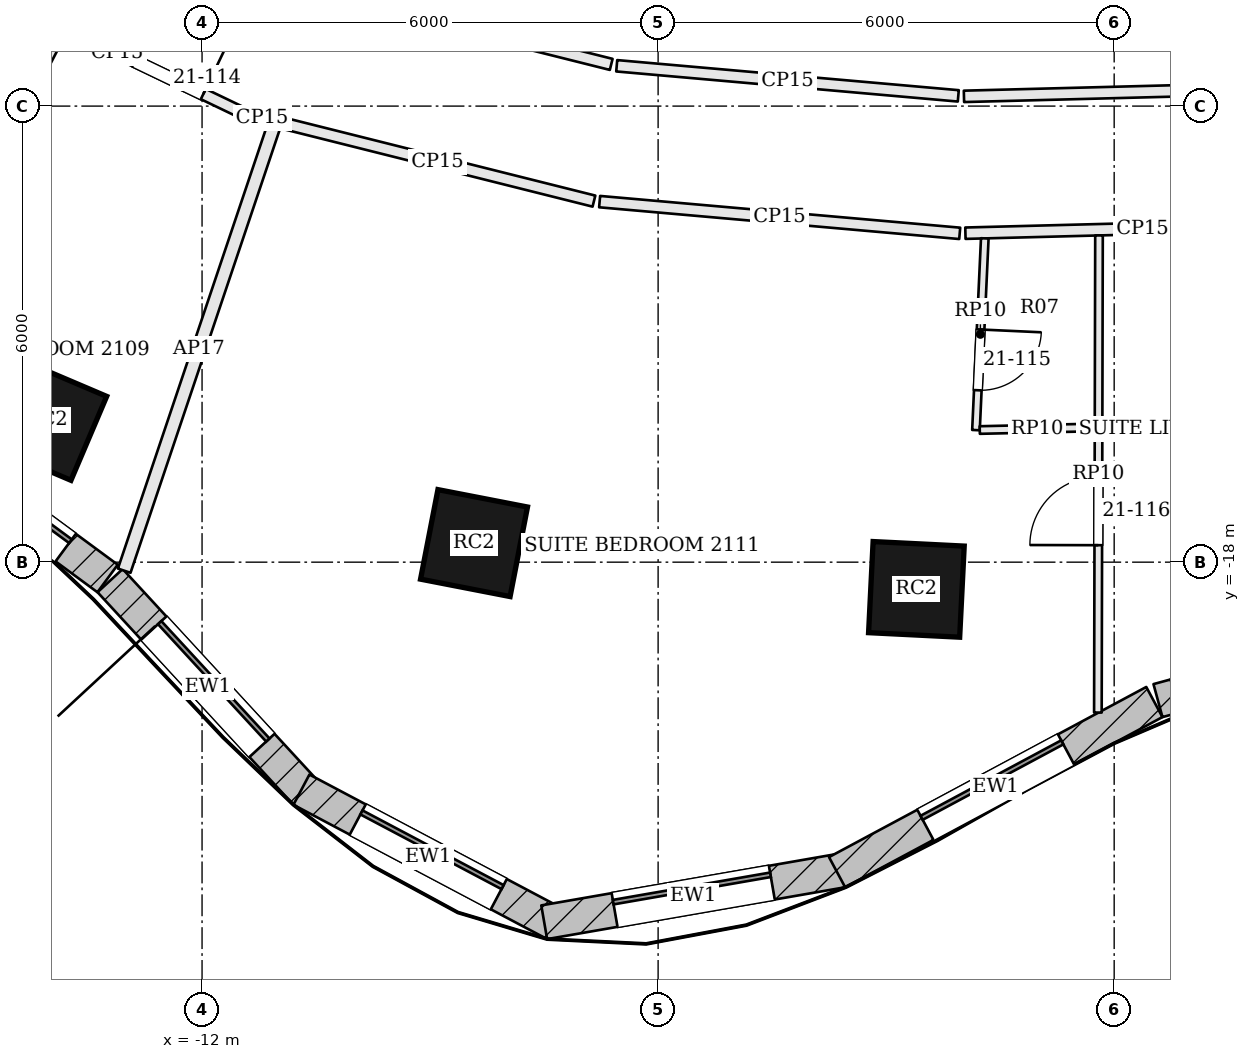
"""IFC4 building model, lengths in metres.
Left out: names, types, materials, properties, quantities, classifications, styles, units other than length and angle.
Written with IfcOpenShell. Run it as: python <this file> out.ifc"""

import sys

from ifc_helpers import new_model, si_unit, direction, frame, frame_2d, origin, origin_2d, place, context, subcontext, project, spatial, rectangle, extrude, element, fill, save


model = new_model("IFC4")
c1 = context("Model", 3, precision=1e-05, world=origin(), true_north=direction((0.0, 1.0)))
c2 = subcontext(c1, "Body", "Model", "MODEL_VIEW")
j1 = project(units=[si_unit("LENGTHUNIT", "METRE"), si_unit("PLANEANGLEUNIT", "RADIAN")], contexts=[c1])
p1 = place(None, origin())
s1 = spatial("IfcSite", under=j1, at=p1, CompositionType="ELEMENT")
p2 = place(p1, origin())
s2 = spatial("IfcBuilding", under=s1, at=p2, CompositionType="ELEMENT")
p3 = place(p2, frame((0.0, 0.0, 92.4)))
s3 = spatial("IfcBuildingStorey", under=s2, at=p3, CompositionType="ELEMENT", Elevation=92.4)
for number, where, z_axis, x_axis in (
    (1, (-14.042, -16.136, 0.0), (0.0, 0.0, 1.0), (0.92, -0.392, 0.0)),
    (2, (-8.422, -17.749, 0.0), (0.0, 0.0, 1.0), (0.982, -0.191, 0.0)),
    (3, (-2.602, -18.358, 0.0), (0.0, 0.0, 1.0), (0.999, -0.05, 0.0)),
):
    element("IfcColumn", number, at=place(p3, frame(where, z_axis=z_axis, x_axis=x_axis)), inside=s3, PredefinedType="COLUMN", context=c2, shape_type="SweptSolid", body=[
        extrude(rectangle(XDim=1.2, YDim=1.2, at=origin_2d()), origin(), (0.0, 0.0, 1.0), 3.6),
    ])
p4 = place(p3, frame((-16.036, -16.158, 0.0), z_axis=(0.0, 0.0, 1.0), x_axis=(0.805181432967, -0.593028549064, 0.0)))
e4 = element("IfcWall", 4, at=p4, inside=s3, PredefinedType="SOLIDWALL", context=c2, shape_type="SweptSolid", body=[
    extrude(rectangle(XDim=3.469, YDim=0.45, at=frame_2d((1.734, 0.0))), origin(), (0.0, 0.0, 1.0), 3.4),
])
p5 = place(p4, frame((0.684, 0.0, 0.9)))
e5 = element("IfcOpeningElement", 5, at=p5, cuts=e4, PredefinedType="OPENING", context=c2, shape_type="SweptSolid", body=[
    extrude(rectangle(XDim=2.1, YDim=2.0, at=frame_2d((1.05, 1.0))), frame((0.0, 0.235, 0.0), z_axis=(0.0, -1.0, 0.0), x_axis=(1.0, 0.0, 0.0)), (0.0, 0.0, 1.0), 0.47),
])
p6 = place(p3, frame((-13.209, -18.243, 0.0), z_axis=(0.0, 0.0, 1.0), x_axis=(0.677612152497, -0.735419452278, 0.0)))
e6 = element("IfcWall", 6, at=p6, inside=s3, PredefinedType="SOLIDWALL", context=c2, shape_type="SweptSolid", body=[
    extrude(rectangle(XDim=3.797, YDim=0.45, at=frame_2d((1.898, 0.0))), origin(), (0.0, 0.0, 1.0), 3.4),
])
p7 = place(p6, frame((0.848, 0.0, 0.9)))
e7 = element("IfcOpeningElement", 7, at=p7, cuts=e6, PredefinedType="OPENING", context=c2, shape_type="SweptSolid", body=[
    extrude(rectangle(XDim=2.1, YDim=2.0, at=frame_2d((1.05, 1.0))), frame((0.0, 0.235, 0.0), z_axis=(0.0, -1.0, 0.0), x_axis=(1.0, 0.0, 0.0)), (0.0, 0.0, 1.0), 0.47),
])
p8 = place(p3, frame((-10.693, -20.993, 0.0), z_axis=(0.0, 0.0, 1.0), x_axis=(0.883817790726, -0.46783128668, 0.0)))
e8 = element("IfcWall", 8, at=p8, inside=s3, PredefinedType="SOLIDWALL", context=c2, shape_type="SweptSolid", body=[
    extrude(rectangle(XDim=3.777, YDim=0.45, at=frame_2d((1.888, 0.0))), origin(), (0.0, 0.0, 1.0), 3.4),
])
p9 = place(p8, frame((0.838, 0.0, 0.9)))
e9 = element("IfcOpeningElement", 9, at=p9, cuts=e8, PredefinedType="OPENING", context=c2, shape_type="SweptSolid", body=[
    extrude(rectangle(XDim=2.1, YDim=2.0, at=frame_2d((1.05, 1.0))), frame((0.0, 0.235, 0.0), z_axis=(0.0, -1.0, 0.0), x_axis=(1.0, 0.0, 0.0)), (0.0, 0.0, 1.0), 0.47),
])
p10 = place(p3, frame((-7.499, -22.737, 0.0), z_axis=(0.0, 0.0, 1.0), x_axis=(0.98521220506, 0.171338585849, 0.0)))
e10 = element("IfcWall", 10, at=p10, inside=s3, PredefinedType="SOLIDWALL", context=c2, shape_type="SweptSolid", body=[
    extrude(rectangle(XDim=3.98, YDim=0.45, at=frame_2d((1.99, 0.0))), origin(), (0.0, 0.0, 1.0), 3.4),
])
p11 = place(p10, frame((0.94, 0.0, 0.9)))
e11 = element("IfcOpeningElement", 11, at=p11, cuts=e10, PredefinedType="OPENING", context=c2, shape_type="SweptSolid", body=[
    extrude(rectangle(XDim=2.1, YDim=2.0, at=frame_2d((1.05, 1.0))), frame((0.0, 0.235, 0.0), z_axis=(0.0, -1.0, 0.0), x_axis=(1.0, 0.0, 0.0)), (0.0, 0.0, 1.0), 0.47),
])
p12 = place(p3, frame((-3.646, -22.079, 0.0), z_axis=(0.0, 0.0, 1.0), x_axis=(0.881279133897, 0.472596115259, 0.0)))
e12 = element("IfcWall", 12, at=p12, inside=s3, PredefinedType="SOLIDWALL", context=c2, shape_type="SweptSolid", body=[
    extrude(rectangle(XDim=4.737, YDim=0.45, at=frame_2d((2.368, 0.0))), origin(), (0.0, 0.0, 1.0), 3.4),
])
p13 = place(p12, frame((1.318, 0.0, 0.9)))
e13 = element("IfcOpeningElement", 13, at=p13, cuts=e12, PredefinedType="OPENING", context=c2, shape_type="SweptSolid", body=[
    extrude(rectangle(XDim=2.1, YDim=2.0, at=frame_2d((1.05, 1.0))), frame((0.0, 0.235, 0.0), z_axis=(0.0, -1.0, 0.0), x_axis=(1.0, 0.0, 0.0)), (0.0, 0.0, 1.0), 0.47),
])
p14 = place(p3, frame((0.576, -19.821, 0.0), z_axis=(0.0, 0.0, 1.0), x_axis=(0.965009398019, 0.262215296532, 0.0)))
e14 = element("IfcWall", 14, at=p14, inside=s3, PredefinedType="SOLIDWALL", context=c2, shape_type="SweptSolid", body=[
    extrude(rectangle(XDim=2.565, YDim=0.45, at=frame_2d((1.283, 0.0))), origin(), (0.0, 0.0, 1.0), 3.4),
])
p15 = place(p14, frame((0.233, 0.0, 0.9)))
e15 = element("IfcOpeningElement", 15, at=p15, cuts=e14, PredefinedType="OPENING", context=c2, shape_type="SweptSolid", body=[
    extrude(rectangle(XDim=2.1, YDim=2.0, at=frame_2d((1.05, 1.0))), frame((0.0, 0.235, 0.0), z_axis=(0.0, -1.0, 0.0), x_axis=(1.0, 0.0, 0.0)), (0.0, 0.0, 1.0), 0.47),
])
p16 = place(p3, frame((-14.771, -10.503, 0.0), z_axis=(0.0, 0.0, 1.0), x_axis=(0.901503349553, -0.432772123346, 0.0)))
e16 = element("IfcWall", 16, at=p16, inside=s3, PredefinedType="PARTITIONING", context=c2, shape_type="SweptSolid", body=[
    extrude(rectangle(XDim=3.673, YDim=0.15, at=frame_2d((1.836, 0.0))), origin(), (0.0, 0.0, 1.0), 2.784),
])
p17 = place(p16, frame((2.092, 0.0, 0.0)))
e17 = element("IfcOpeningElement", 17, at=p17, cuts=e16, PredefinedType="OPENING", context=c2, shape_type="SweptSolid", body=[
    extrude(rectangle(XDim=1.0, YDim=2.1, at=frame_2d((0.5, 1.05))), frame((0.0, 0.085, 0.0), z_axis=(0.0, -1.0, 0.0), x_axis=(1.0, 0.0, 0.0)), (0.0, 0.0, 1.0), 0.17),
])
p18 = place(p3, frame((-11.387, -12.111, 0.0), z_axis=(0.0, 0.0, 1.0), x_axis=(0.969945028314, -0.243324150157, 0.0)))
e18 = element("IfcWall", 18, at=p18, inside=s3, PredefinedType="PARTITIONING", context=c2, shape_type="SweptSolid", body=[
    extrude(rectangle(XDim=0.364, YDim=0.15, at=frame_2d((0.182, 0.0))), origin(), (0.0, 0.0, 1.0), 2.784),
])
p19 = place(p3, frame((-13.024, -18.112, 0.0), z_axis=(0.0, 0.0, 1.0), x_axis=(0.319078434674, 0.947728311556, 0.0)))
e19 = element("IfcWall", 19, at=p19, inside=s3, PredefinedType="PARTITIONING", context=c2, shape_type="SweptSolid", body=[
    extrude(rectangle(XDim=6.163, YDim=0.175, at=frame_2d((3.082, 0.0))), origin(), (0.0, 0.0, 1.0), 2.784),
])
p20 = place(p3, frame((-10.961, -12.218, 0.0), z_axis=(0.0, 0.0, 1.0), x_axis=(0.969990045386, -0.243144631551, 0.0)))
e20 = element("IfcWall", 20, at=p20, inside=s3, PredefinedType="PARTITIONING", context=c2, shape_type="SweptSolid", body=[
    extrude(rectangle(XDim=4.244, YDim=0.15, at=frame_2d((2.122, 0.0))), origin(), (0.0, 0.0, 1.0), 2.784),
])
p21 = place(p3, frame((-6.77, -13.257, 0.0), z_axis=(0.0, 0.0, 1.0), x_axis=(0.996139758015, -0.08778144737, 0.0)))
e21 = element("IfcWall", 21, at=p21, inside=s3, PredefinedType="PARTITIONING", context=c2, shape_type="SweptSolid", body=[
    extrude(rectangle(XDim=4.756, YDim=0.15, at=frame_2d((2.378, 0.0))), origin(), (0.0, 0.0, 1.0), 2.784),
])
p22 = place(p3, frame((-1.957, -13.672, 0.0), z_axis=(0.0, 0.0, 1.0), x_axis=(0.999664413823, 0.025904820691, 0.0)))
e22 = element("IfcWall", 22, at=p22, inside=s3, PredefinedType="PARTITIONING", context=c2, shape_type="SweptSolid", body=[
    extrude(rectangle(XDim=4.665, YDim=0.15, at=frame_2d((2.333, 0.0))), origin(), (0.0, 0.0, 1.0), 2.784),
])
p23 = place(p22, frame((2.712, 0.0, 0.0)))
e23 = element("IfcOpeningElement", 23, at=p23, cuts=e22, PredefinedType="OPENING", context=c2, shape_type="SweptSolid", body=[
    extrude(rectangle(XDim=1.0, YDim=2.1, at=frame_2d((0.5, 1.05))), frame((0.0, 0.085, 0.0), z_axis=(0.0, -1.0, 0.0), x_axis=(1.0, 0.0, 0.0)), (0.0, 0.0, 1.0), 0.17),
])
p24 = place(p3, frame((4.684, -11.699, 0.0), z_axis=(0.0, 0.0, 1.0), x_axis=(-0.999663438204, -0.025942442425, 0.0)))
e24 = element("IfcWall", 24, at=p24, inside=s3, PredefinedType="PARTITIONING", context=c2, shape_type="SweptSolid", body=[
    extrude(rectangle(XDim=6.663, YDim=0.15, at=frame_2d((3.332, 0.0))), origin(), (0.0, 0.0, 1.0), 2.784),
])
p25 = place(p3, frame((-2.051, -11.865, 0.0), z_axis=(0.0, 0.0, 1.0), x_axis=(-0.996139599493, 0.087783246245, 0.0)))
e25 = element("IfcWall", 25, at=p25, inside=s3, PredefinedType="PARTITIONING", context=c2, shape_type="SweptSolid", body=[
    extrude(rectangle(XDim=4.511, YDim=0.15, at=frame_2d((2.255, 0.0))), origin(), (0.0, 0.0, 1.0), 2.784),
])
p26 = place(p3, frame((-6.617, -11.451, 0.0), z_axis=(0.0, 0.0, 1.0), x_axis=(-0.969987441267, 0.243155020069, 0.0)))
e26 = element("IfcWall", 26, at=p26, inside=s3, PredefinedType="PARTITIONING", context=c2, shape_type="SweptSolid", body=[
    extrude(rectangle(XDim=4.359, YDim=0.15, at=frame_2d((2.179, 0.0))), origin(), (0.0, 0.0, 1.0), 2.784),
])
p27 = place(p3, frame((-16.341, -15.862, 0.0), z_axis=(0.0, 0.0, 1.0), x_axis=(0.460149427678, 0.887841485969, 0.0)))
e27 = element("IfcWall", 27, at=p27, inside=s3, PredefinedType="PARTITIONING", context=c2, shape_type="SweptSolid", body=[
    extrude(rectangle(XDim=5.438, YDim=0.1, at=frame_2d((2.719, 0.0))), origin(), (0.0, 0.0, 1.0), 2.884),
])
p28 = place(p27, frame((1.363, 0.0, 0.0)))
e28 = element("IfcOpeningElement", 28, at=p28, cuts=e27, PredefinedType="OPENING", context=c2, shape_type="SweptSolid", body=[
    extrude(rectangle(XDim=0.9, YDim=2.4, at=frame_2d((0.45, 1.2))), frame((0.0, 0.06, 0.0), z_axis=(0.0, -1.0, 0.0), x_axis=(1.0, 0.0, 0.0)), (0.0, 0.0, 1.0), 0.12),
])
p29 = place(p3, frame((-0.214, -19.979, 0.0), z_axis=(0.0, 0.0, 1.0), x_axis=(0.002333625165, 0.999997277093, 0.0)))
e29 = element("IfcWall", 29, at=p29, inside=s3, PredefinedType="PARTITIONING", context=c2, shape_type="SweptSolid", body=[
    extrude(rectangle(XDim=6.277, YDim=0.1, at=frame_2d((3.139, 0.0))), origin(), (0.0, 0.0, 1.0), 2.884),
])
p30 = place(p29, frame((2.202, 0.0, 0.0)))
e30 = element("IfcOpeningElement", 30, at=p30, cuts=e29, PredefinedType="OPENING", context=c2, shape_type="SweptSolid", body=[
    extrude(rectangle(XDim=0.9, YDim=2.4, at=frame_2d((0.45, 1.2))), frame((0.0, 0.06, 0.0), z_axis=(0.0, -1.0, 0.0), x_axis=(1.0, 0.0, 0.0)), (0.0, 0.0, 1.0), 0.12),
])
p31 = place(p3, frame((-1.702, -13.74, 0.0), z_axis=(0.0, 0.0, 1.0), x_axis=(-0.045833111847, -0.998949110745, 0.0)))
e31 = element("IfcWall", 31, at=p31, inside=s3, PredefinedType="PARTITIONING", context=c2, shape_type="SweptSolid", body=[
    extrude(rectangle(XDim=2.525, YDim=0.1, at=frame_2d((1.262, 0.0))), origin(), (0.0, 0.0, 1.0), 2.884),
])
p32 = place(p31, frame((1.2, 0.0, 0.0)))
e32 = element("IfcOpeningElement", 32, at=p32, cuts=e31, PredefinedType="OPENING", context=c2, shape_type="SweptSolid", body=[
    extrude(rectangle(XDim=0.8, YDim=2.1, at=frame_2d((0.4, 1.05))), frame((0.0, 0.06, 0.0), z_axis=(0.0, -1.0, 0.0), x_axis=(1.0, 0.0, 0.0)), (0.0, 0.0, 1.0), 0.12),
])
p33 = place(p3, frame((-1.768, -16.262, 0.0), z_axis=(0.0, 0.0, 1.0), x_axis=(0.999748456617, 0.022428185195, 0.0)))
e33 = element("IfcWall", 33, at=p33, inside=s3, PredefinedType="PARTITIONING", context=c2, shape_type="SweptSolid", body=[
    extrude(rectangle(XDim=1.513, YDim=0.1, at=frame_2d((0.757, 0.0))), origin(), (0.0, 0.0, 1.0), 2.884),
])
p34 = place(p5, origin())
e34 = element("IfcWindow", 34, at=p34, inside=s3, PartitioningType="SINGLE_PANEL", PredefinedType="WINDOW", context=c2, shape_type="SweptSolid", body=[
    extrude(rectangle(XDim=2.1, YDim=2.0, at=frame_2d((1.05, 1.0))), frame((0.0, 0.135, 0.0), z_axis=(0.0, -1.0, 0.0), x_axis=(1.0, 0.0, 0.0)), (0.0, 0.0, 1.0), 0.06),
])
fill(e5, e34)
p35 = place(p7, origin())
e35 = element("IfcWindow", 35, at=p35, inside=s3, PartitioningType="SINGLE_PANEL", PredefinedType="WINDOW", context=c2, shape_type="SweptSolid", body=[
    extrude(rectangle(XDim=2.1, YDim=2.0, at=frame_2d((1.05, 1.0))), frame((0.0, 0.135, 0.0), z_axis=(0.0, -1.0, 0.0), x_axis=(1.0, 0.0, 0.0)), (0.0, 0.0, 1.0), 0.06),
])
fill(e7, e35)
p36 = place(p9, origin())
e36 = element("IfcWindow", 36, at=p36, inside=s3, PartitioningType="SINGLE_PANEL", PredefinedType="WINDOW", context=c2, shape_type="SweptSolid", body=[
    extrude(rectangle(XDim=2.1, YDim=2.0, at=frame_2d((1.05, 1.0))), frame((0.0, 0.135, 0.0), z_axis=(0.0, -1.0, 0.0), x_axis=(1.0, 0.0, 0.0)), (0.0, 0.0, 1.0), 0.06),
])
fill(e9, e36)
p37 = place(p11, origin())
e37 = element("IfcWindow", 37, at=p37, inside=s3, PartitioningType="SINGLE_PANEL", PredefinedType="WINDOW", context=c2, shape_type="SweptSolid", body=[
    extrude(rectangle(XDim=2.1, YDim=2.0, at=frame_2d((1.05, 1.0))), frame((0.0, 0.135, 0.0), z_axis=(0.0, -1.0, 0.0), x_axis=(1.0, 0.0, 0.0)), (0.0, 0.0, 1.0), 0.06),
])
fill(e11, e37)
p38 = place(p13, origin())
e38 = element("IfcWindow", 38, at=p38, inside=s3, PartitioningType="SINGLE_PANEL", PredefinedType="WINDOW", context=c2, shape_type="SweptSolid", body=[
    extrude(rectangle(XDim=2.1, YDim=2.0, at=frame_2d((1.05, 1.0))), frame((0.0, 0.135, 0.0), z_axis=(0.0, -1.0, 0.0), x_axis=(1.0, 0.0, 0.0)), (0.0, 0.0, 1.0), 0.06),
])
fill(e13, e38)
p39 = place(p17, origin())
e39 = element("IfcDoor", 39, at=p39, inside=s3, OperationType="SINGLE_SWING_RIGHT", PredefinedType="DOOR", context=c2, shape_type="SweptSolid", body=[
    extrude(rectangle(XDim=1.0, YDim=2.1, at=frame_2d((0.5, 1.05))), frame((0.0, 0.025, 0.0), z_axis=(0.0, -1.0, 0.0), x_axis=(1.0, 0.0, 0.0)), (0.0, 0.0, 1.0), 0.05),
])
fill(e17, e39)
p40 = place(p32, origin())
e40 = element("IfcDoor", 40, at=p40, inside=s3, OperationType="SINGLE_SWING_LEFT", PredefinedType="DOOR", context=c2, shape_type="SweptSolid", body=[
    extrude(rectangle(XDim=0.8, YDim=2.1, at=frame_2d((0.4, 1.05))), frame((0.0, 0.025, 0.0), z_axis=(0.0, -1.0, 0.0), x_axis=(1.0, 0.0, 0.0)), (0.0, 0.0, 1.0), 0.05),
])
fill(e32, e40)
p41 = place(p30, origin())
e41 = element("IfcDoor", 41, at=p41, inside=s3, OperationType="SINGLE_SWING_LEFT", PredefinedType="DOOR", context=c2, shape_type="SweptSolid", body=[
    extrude(rectangle(XDim=0.9, YDim=2.4, at=frame_2d((0.45, 1.2))), frame((0.0, 0.025, 0.0), z_axis=(0.0, -1.0, 0.0), x_axis=(1.0, 0.0, 0.0)), (0.0, 0.0, 1.0), 0.05),
])
fill(e30, e41)
save(model, sys.argv[1])
